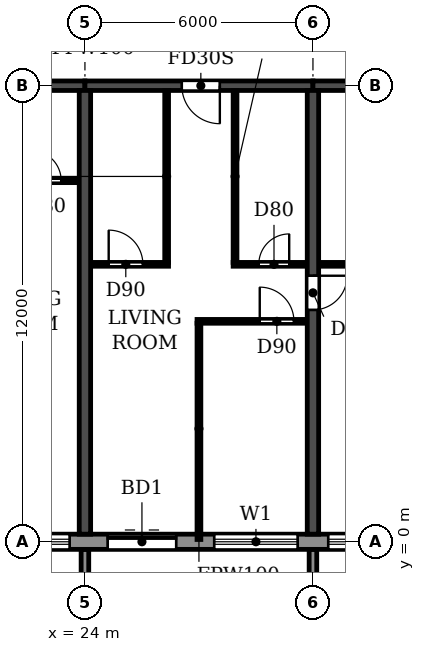
"""IFC4 building model, lengths in metres.
Left out: names, types, materials, properties, quantities, classifications, styles, units other than length and angle.
Written with IfcOpenShell. Run it as: python <this file> out.ifc"""

import sys

from ifc_helpers import new_model, si_unit, direction, frame, frame_2d, origin, place, context, subcontext, project, spatial, polyline, rectangle, outline, extrude, source, transform, mapped, element, fill, save


model = new_model("IFC4")
c1 = context("Model", 3, precision=1e-05, world=origin(), true_north=direction((0.0, 1.0)))
c2 = subcontext(c1, "Body", "Model", "MODEL_VIEW")
j1 = project(units=[si_unit("LENGTHUNIT", "METRE"), si_unit("PLANEANGLEUNIT", "RADIAN")], contexts=[c1])
p1 = place(None, origin())
s1 = spatial("IfcSite", under=j1, at=p1, CompositionType="ELEMENT")
p2 = place(p1, origin())
s2 = spatial("IfcBuilding", under=s1, at=p2, CompositionType="ELEMENT")
p3 = place(p2, frame((0.0, 0.0, 155.4)))
s3 = spatial("IfcBuildingStorey", under=s2, at=p3, CompositionType="ELEMENT", Elevation=155.4)
p4 = place(p3, frame((24.0, 0.2, 0.0), z_axis=(0.0, 0.0, 1.0), x_axis=(0.0, 1.0, 0.0)))
e1 = element("IfcWall", 1, at=p4, inside=s3, PredefinedType="SHEAR", context=c2, shape_type="SweptSolid", body=[
    extrude(rectangle(XDim=11.675, YDim=0.3, at=frame_2d((5.837, 0.0))), origin(), (0.0, 0.0, 1.0), 3.0),
])
p5 = place(p3, frame((30.0, 0.2, 0.0), z_axis=(0.0, 0.0, 1.0), x_axis=(0.0, 1.0, 0.0)))
e2 = element("IfcWall", 2, at=p5, inside=s3, PredefinedType="SHEAR", context=c2, shape_type="SweptSolid", body=[
    extrude(rectangle(XDim=11.675, YDim=0.3, at=frame_2d((5.837, 0.0))), origin(), (0.0, 0.0, 1.0), 3.0),
])
p6 = place(p5, frame((5.9, 0.0, 0.0)))
e3 = element("IfcOpeningElement", 3, at=p6, cuts=e2, PredefinedType="OPENING", context=c2, shape_type="SweptSolid", body=[
    extrude(rectangle(XDim=0.9, YDim=2.1, at=frame_2d((0.45, 1.05))), frame((0.0, 0.16, 0.0), z_axis=(0.0, -1.0, 0.0), x_axis=(1.0, 0.0, 0.0)), (0.0, 0.0, 1.0), 0.32),
])
p7 = place(p3, frame((18.0, 12.0, 0.0), z_axis=(0.0, 0.0, 1.0), x_axis=(1.0, 0.0, 0.0)))
e4 = element("IfcWall", 4, at=p7, inside=s3, PredefinedType="SHEAR", context=c2, shape_type="SweptSolid", body=[
    extrude(rectangle(XDim=6.0, YDim=0.25, at=frame_2d((3.0, 0.0))), origin(), (0.0, 0.0, 1.0), 2.4),
])
p8 = place(p7, frame((2.55, 0.0, 0.0)))
e5 = element("IfcOpeningElement", 5, at=p8, cuts=e4, PredefinedType="OPENING", context=c2, shape_type="SweptSolid", body=[
    extrude(rectangle(XDim=1.0, YDim=2.1, at=frame_2d((0.5, 1.05))), frame((0.0, 0.135, 0.0), z_axis=(0.0, -1.0, 0.0), x_axis=(1.0, 0.0, 0.0)), (0.0, 0.0, 1.0), 0.27),
])
p9 = place(p3, frame((24.0, 12.0, 0.0), z_axis=(0.0, 0.0, 1.0), x_axis=(1.0, 0.0, 0.0)))
e6 = element("IfcWall", 6, at=p9, inside=s3, PredefinedType="SHEAR", context=c2, shape_type="SweptSolid", body=[
    extrude(rectangle(XDim=6.0, YDim=0.25, at=frame_2d((3.0, 0.0))), origin(), (0.0, 0.0, 1.0), 2.4),
])
p10 = place(p9, frame((2.55, 0.0, 0.0)))
e7 = element("IfcOpeningElement", 7, at=p10, cuts=e6, PredefinedType="OPENING", context=c2, shape_type="SweptSolid", body=[
    extrude(rectangle(XDim=1.0, YDim=2.1, at=frame_2d((0.5, 1.05))), frame((0.0, 0.135, 0.0), z_axis=(0.0, -1.0, 0.0), x_axis=(1.0, 0.0, 0.0)), (0.0, 0.0, 1.0), 0.27),
])
p11 = place(p3, frame((30.0, 12.0, 0.0), z_axis=(0.0, 0.0, 1.0), x_axis=(1.0, 0.0, 0.0)))
e8 = element("IfcWall", 8, at=p11, inside=s3, PredefinedType="SHEAR", context=c2, shape_type="SweptSolid", body=[
    extrude(rectangle(XDim=6.0, YDim=0.25, at=frame_2d((3.0, 0.0))), origin(), (0.0, 0.0, 1.0), 2.4),
])
p12 = place(p3, frame((16.683, 0.0, 0.0), z_axis=(0.0, 0.0, 1.0), x_axis=(1.0, 0.0, 0.0)))
e9 = element("IfcWall", 9, at=p12, inside=s3, PredefinedType="STANDARD", context=c2, shape_type="SweptSolid", body=[
    extrude(rectangle(XDim=68.634, YDim=0.4, at=frame_2d((34.317, 0.0))), origin(), (0.0, 0.0, 1.0), 3.0),
])
p13 = place(p12, frame((1.717, 0.0, 0.9)))
e10 = element("IfcOpeningElement", 10, at=p13, cuts=e9, PredefinedType="OPENING", context=c2, shape_type="SweptSolid", body=[
    extrude(rectangle(XDim=2.2, YDim=1.5, at=frame_2d((1.1, 0.75))), frame((0.0, 0.21, 0.0), z_axis=(0.0, -1.0, 0.0), x_axis=(1.0, 0.0, 0.0)), (0.0, 0.0, 1.0), 0.42),
])
p14 = place(p12, frame((4.717, 0.0, 0.9)))
e11 = element("IfcOpeningElement", 11, at=p14, cuts=e9, PredefinedType="OPENING", context=c2, shape_type="SweptSolid", body=[
    extrude(rectangle(XDim=2.2, YDim=1.5, at=frame_2d((1.1, 0.75))), frame((0.0, 0.21, 0.0), z_axis=(0.0, -1.0, 0.0), x_axis=(1.0, 0.0, 0.0)), (0.0, 0.0, 1.0), 0.42),
])
p15 = place(p12, frame((7.917, 0.0, 0.0)))
e12 = element("IfcOpeningElement", 12, at=p15, cuts=e9, PredefinedType="OPENING", context=c2, shape_type="SweptSolid", body=[
    extrude(rectangle(XDim=1.8, YDim=2.4, at=frame_2d((0.9, 1.2))), frame((0.0, 0.21, 0.0), z_axis=(0.0, -1.0, 0.0), x_axis=(1.0, 0.0, 0.0)), (0.0, 0.0, 1.0), 0.42),
])
p16 = place(p12, frame((10.717, 0.0, 0.9)))
e13 = element("IfcOpeningElement", 13, at=p16, cuts=e9, PredefinedType="OPENING", context=c2, shape_type="SweptSolid", body=[
    extrude(rectangle(XDim=2.2, YDim=1.5, at=frame_2d((1.1, 0.75))), frame((0.0, 0.21, 0.0), z_axis=(0.0, -1.0, 0.0), x_axis=(1.0, 0.0, 0.0)), (0.0, 0.0, 1.0), 0.42),
])
p17 = place(p12, frame((13.717, 0.0, 0.9)))
e14 = element("IfcOpeningElement", 14, at=p17, cuts=e9, PredefinedType="OPENING", context=c2, shape_type="SweptSolid", body=[
    extrude(rectangle(XDim=2.2, YDim=1.5, at=frame_2d((1.1, 0.75))), frame((0.0, 0.21, 0.0), z_axis=(0.0, -1.0, 0.0), x_axis=(1.0, 0.0, 0.0)), (0.0, 0.0, 1.0), 0.42),
])
p18 = place(p12, frame((16.717, 0.0, 0.9)))
e15 = element("IfcOpeningElement", 15, at=p18, cuts=e9, PredefinedType="OPENING", context=c2, shape_type="SweptSolid", body=[
    extrude(rectangle(XDim=2.2, YDim=1.5, at=frame_2d((1.1, 0.75))), frame((0.0, 0.21, 0.0), z_axis=(0.0, -1.0, 0.0), x_axis=(1.0, 0.0, 0.0)), (0.0, 0.0, 1.0), 0.42),
])
p19 = place(p12, frame((19.717, 0.0, 0.9)))
e16 = element("IfcOpeningElement", 16, at=p19, cuts=e9, PredefinedType="OPENING", context=c2, shape_type="SweptSolid", body=[
    extrude(rectangle(XDim=2.2, YDim=1.5, at=frame_2d((1.1, 0.75))), frame((0.0, 0.21, 0.0), z_axis=(0.0, -1.0, 0.0), x_axis=(1.0, 0.0, 0.0)), (0.0, 0.0, 1.0), 0.42),
])
p20 = place(p12, frame((22.917, 0.0, 0.0)))
e17 = element("IfcOpeningElement", 17, at=p20, cuts=e9, PredefinedType="OPENING", context=c2, shape_type="SweptSolid", body=[
    extrude(rectangle(XDim=1.8, YDim=2.4, at=frame_2d((0.9, 1.2))), frame((0.0, 0.21, 0.0), z_axis=(0.0, -1.0, 0.0), x_axis=(1.0, 0.0, 0.0)), (0.0, 0.0, 1.0), 0.42),
])
p21 = place(p12, frame((25.717, 0.0, 0.9)))
e18 = element("IfcOpeningElement", 18, at=p21, cuts=e9, PredefinedType="OPENING", context=c2, shape_type="SweptSolid", body=[
    extrude(rectangle(XDim=2.2, YDim=1.5, at=frame_2d((1.1, 0.75))), frame((0.0, 0.21, 0.0), z_axis=(0.0, -1.0, 0.0), x_axis=(1.0, 0.0, 0.0)), (0.0, 0.0, 1.0), 0.42),
])
p22 = place(p12, frame((28.717, 0.0, 0.9)))
e19 = element("IfcOpeningElement", 19, at=p22, cuts=e9, PredefinedType="OPENING", context=c2, shape_type="SweptSolid", body=[
    extrude(rectangle(XDim=2.2, YDim=1.5, at=frame_2d((1.1, 0.75))), frame((0.0, 0.21, 0.0), z_axis=(0.0, -1.0, 0.0), x_axis=(1.0, 0.0, 0.0)), (0.0, 0.0, 1.0), 0.42),
])
p23 = place(p12, frame((31.917, 0.0, 0.0)))
e20 = element("IfcOpeningElement", 20, at=p23, cuts=e9, PredefinedType="OPENING", context=c2, shape_type="SweptSolid", body=[
    extrude(rectangle(XDim=1.8, YDim=2.4, at=frame_2d((0.9, 1.2))), frame((0.0, 0.21, 0.0), z_axis=(0.0, -1.0, 0.0), x_axis=(1.0, 0.0, 0.0)), (0.0, 0.0, 1.0), 0.42),
])
p24 = place(p12, frame((34.717, 0.0, 0.9)))
e21 = element("IfcOpeningElement", 21, at=p24, cuts=e9, PredefinedType="OPENING", context=c2, shape_type="SweptSolid", body=[
    extrude(rectangle(XDim=2.2, YDim=1.5, at=frame_2d((1.1, 0.75))), frame((0.0, 0.21, 0.0), z_axis=(0.0, -1.0, 0.0), x_axis=(1.0, 0.0, 0.0)), (0.0, 0.0, 1.0), 0.42),
])
p25 = place(p12, frame((37.717, 0.0, 0.9)))
e22 = element("IfcOpeningElement", 22, at=p25, cuts=e9, PredefinedType="OPENING", context=c2, shape_type="SweptSolid", body=[
    extrude(rectangle(XDim=2.2, YDim=1.5, at=frame_2d((1.1, 0.75))), frame((0.0, 0.21, 0.0), z_axis=(0.0, -1.0, 0.0), x_axis=(1.0, 0.0, 0.0)), (0.0, 0.0, 1.0), 0.42),
])
p26 = place(p12, frame((40.717, 0.0, 0.9)))
e23 = element("IfcOpeningElement", 23, at=p26, cuts=e9, PredefinedType="OPENING", context=c2, shape_type="SweptSolid", body=[
    extrude(rectangle(XDim=2.2, YDim=1.5, at=frame_2d((1.1, 0.75))), frame((0.0, 0.21, 0.0), z_axis=(0.0, -1.0, 0.0), x_axis=(1.0, 0.0, 0.0)), (0.0, 0.0, 1.0), 0.42),
])
p27 = place(p12, frame((43.717, 0.0, 0.9)))
e24 = element("IfcOpeningElement", 24, at=p27, cuts=e9, PredefinedType="OPENING", context=c2, shape_type="SweptSolid", body=[
    extrude(rectangle(XDim=2.2, YDim=1.5, at=frame_2d((1.1, 0.75))), frame((0.0, 0.21, 0.0), z_axis=(0.0, -1.0, 0.0), x_axis=(1.0, 0.0, 0.0)), (0.0, 0.0, 1.0), 0.42),
])
p28 = place(p12, frame((46.917, 0.0, 0.0)))
e25 = element("IfcOpeningElement", 25, at=p28, cuts=e9, PredefinedType="OPENING", context=c2, shape_type="SweptSolid", body=[
    extrude(rectangle(XDim=1.8, YDim=2.4, at=frame_2d((0.9, 1.2))), frame((0.0, 0.21, 0.0), z_axis=(0.0, -1.0, 0.0), x_axis=(1.0, 0.0, 0.0)), (0.0, 0.0, 1.0), 0.42),
])
p29 = place(p12, frame((49.717, 0.0, 0.9)))
e26 = element("IfcOpeningElement", 26, at=p29, cuts=e9, PredefinedType="OPENING", context=c2, shape_type="SweptSolid", body=[
    extrude(rectangle(XDim=2.2, YDim=1.5, at=frame_2d((1.1, 0.75))), frame((0.0, 0.21, 0.0), z_axis=(0.0, -1.0, 0.0), x_axis=(1.0, 0.0, 0.0)), (0.0, 0.0, 1.0), 0.42),
])
p30 = place(p12, frame((52.717, 0.0, 0.9)))
e27 = element("IfcOpeningElement", 27, at=p30, cuts=e9, PredefinedType="OPENING", context=c2, shape_type="SweptSolid", body=[
    extrude(rectangle(XDim=2.2, YDim=1.5, at=frame_2d((1.1, 0.75))), frame((0.0, 0.21, 0.0), z_axis=(0.0, -1.0, 0.0), x_axis=(1.0, 0.0, 0.0)), (0.0, 0.0, 1.0), 0.42),
])
p31 = place(p12, frame((55.717, 0.0, 0.9)))
e28 = element("IfcOpeningElement", 28, at=p31, cuts=e9, PredefinedType="OPENING", context=c2, shape_type="SweptSolid", body=[
    extrude(rectangle(XDim=2.2, YDim=1.5, at=frame_2d((1.1, 0.75))), frame((0.0, 0.21, 0.0), z_axis=(0.0, -1.0, 0.0), x_axis=(1.0, 0.0, 0.0)), (0.0, 0.0, 1.0), 0.42),
])
p32 = place(p12, frame((58.917, 0.0, 0.0)))
e29 = element("IfcOpeningElement", 29, at=p32, cuts=e9, PredefinedType="OPENING", context=c2, shape_type="SweptSolid", body=[
    extrude(rectangle(XDim=1.8, YDim=2.4, at=frame_2d((0.9, 1.2))), frame((0.0, 0.21, 0.0), z_axis=(0.0, -1.0, 0.0), x_axis=(1.0, 0.0, 0.0)), (0.0, 0.0, 1.0), 0.42),
])
p33 = place(p12, frame((61.717, 0.0, 0.9)))
e30 = element("IfcOpeningElement", 30, at=p33, cuts=e9, PredefinedType="OPENING", context=c2, shape_type="SweptSolid", body=[
    extrude(rectangle(XDim=2.2, YDim=1.5, at=frame_2d((1.1, 0.75))), frame((0.0, 0.21, 0.0), z_axis=(0.0, -1.0, 0.0), x_axis=(1.0, 0.0, 0.0)), (0.0, 0.0, 1.0), 0.42),
])
p34 = place(p12, frame((64.717, 0.0, 0.9)))
e31 = element("IfcOpeningElement", 31, at=p34, cuts=e9, PredefinedType="OPENING", context=c2, shape_type="SweptSolid", body=[
    extrude(rectangle(XDim=2.2, YDim=1.5, at=frame_2d((1.1, 0.75))), frame((0.0, 0.21, 0.0), z_axis=(0.0, -1.0, 0.0), x_axis=(1.0, 0.0, 0.0)), (0.0, 0.0, 1.0), 0.42),
])
m1 = source(origin(), c2, "Body", "SweptSolid", [
    extrude(outline(polyline([(0.0, 0.0), (0.2, 0.0), (0.2, 1.65), (0.0, 1.65), (0.0, 0.0)])), origin(), (0.0, 0.0, 1.0), 3.1),
])
for number, where in (
    (32, (23.9, -1.85, 0.0)),
    (33, (29.9, -1.85, 0.0)),
):
    element("IfcWall", number, at=place(p3, frame(where)), inside=s3, PredefinedType="STANDARD", context=c2, shape_type="MappedRepresentation", body=[
        mapped(m1, transform((0.0, 0.0, 0.0))),
    ])
p35 = place(p3, frame((26.95, 5.8, 0.0), z_axis=(0.0, 0.0, 1.0), x_axis=(1.0, 0.0, 0.0)))
e34 = element("IfcWall", 34, at=p35, inside=s3, PredefinedType="PARTITIONING", context=c2, shape_type="SweptSolid", body=[
    extrude(rectangle(XDim=2.89, YDim=0.1, at=frame_2d((1.445, 0.0))), origin(), (0.0, 0.0, 1.0), 3.0),
])
p36 = place(p35, frame((1.65, 0.0, 0.0)))
e35 = element("IfcOpeningElement", 35, at=p36, cuts=e34, PredefinedType="OPENING", context=c2, shape_type="SweptSolid", body=[
    extrude(rectangle(XDim=0.9, YDim=2.1, at=frame_2d((0.45, 1.05))), frame((0.0, 0.06, 0.0), z_axis=(0.0, -1.0, 0.0), x_axis=(1.0, 0.0, 0.0)), (0.0, 0.0, 1.0), 0.12),
])
p37 = place(p3, frame((24.16, 7.3, 0.0), z_axis=(0.0, 0.0, 1.0), x_axis=(1.0, 0.0, 0.0)))
e36 = element("IfcWall", 36, at=p37, inside=s3, PredefinedType="PARTITIONING", context=c2, shape_type="SweptSolid", body=[
    extrude(rectangle(XDim=2.04, YDim=0.1, at=frame_2d((1.02, 0.0))), origin(), (0.0, 0.0, 1.0), 3.0),
])
p38 = place(p37, frame((0.465, 0.0, 0.0)))
e37 = element("IfcOpeningElement", 37, at=p38, cuts=e36, PredefinedType="OPENING", context=c2, shape_type="SweptSolid", body=[
    extrude(rectangle(XDim=0.9, YDim=2.1, at=frame_2d((0.45, 1.05))), frame((0.0, 0.06, 0.0), z_axis=(0.0, -1.0, 0.0), x_axis=(1.0, 0.0, 0.0)), (0.0, 0.0, 1.0), 0.12),
])
p39 = place(p3, frame((27.9, 7.3, 0.0), z_axis=(0.0, 0.0, 1.0), x_axis=(1.0, 0.0, 0.0)))
e38 = element("IfcWall", 38, at=p39, inside=s3, PredefinedType="PARTITIONING", context=c2, shape_type="SweptSolid", body=[
    extrude(rectangle(XDim=1.94, YDim=0.1, at=frame_2d((0.97, 0.0))), origin(), (0.0, 0.0, 1.0), 3.0),
])
p40 = place(p39, frame((0.675, 0.0, 0.0)))
e39 = element("IfcOpeningElement", 39, at=p40, cuts=e38, PredefinedType="OPENING", context=c2, shape_type="SweptSolid", body=[
    extrude(rectangle(XDim=0.8, YDim=2.1, at=frame_2d((0.4, 1.05))), frame((0.0, 0.06, 0.0), z_axis=(0.0, -1.0, 0.0), x_axis=(1.0, 0.0, 0.0)), (0.0, 0.0, 1.0), 0.12),
])
p41 = place(p3, frame((30.16, 7.3, 0.0), z_axis=(0.0, 0.0, 1.0), x_axis=(1.0, 0.0, 0.0)))
e40 = element("IfcWall", 40, at=p41, inside=s3, PredefinedType="PARTITIONING", context=c2, shape_type="SweptSolid", body=[
    extrude(rectangle(XDim=2.94, YDim=0.1, at=frame_2d((1.47, 0.0))), origin(), (0.0, 0.0, 1.0), 3.0),
])
p42 = place(p41, frame((0.94, 0.0, 0.0)))
e41 = element("IfcOpeningElement", 41, at=p42, cuts=e40, PredefinedType="OPENING", context=c2, shape_type="SweptSolid", body=[
    extrude(rectangle(XDim=0.8, YDim=2.1, at=frame_2d((0.4, 1.05))), frame((0.0, 0.06, 0.0), z_axis=(0.0, -1.0, 0.0), x_axis=(1.0, 0.0, 0.0)), (0.0, 0.0, 1.0), 0.12),
])
p43 = place(p3, frame((21.9, 9.5, 0.0), z_axis=(0.0, 0.0, 1.0), x_axis=(1.0, 0.0, 0.0)))
e42 = element("IfcWall", 42, at=p43, inside=s3, PredefinedType="PARTITIONING", context=c2, shape_type="SweptSolid", body=[
    extrude(rectangle(XDim=1.94, YDim=0.1, at=frame_2d((0.97, 0.0))), origin(), (0.0, 0.0, 1.0), 3.0),
])
p44 = place(p43, frame((0.675, 0.0, 0.0)))
e43 = element("IfcOpeningElement", 43, at=p44, cuts=e42, PredefinedType="OPENING", context=c2, shape_type="SweptSolid", body=[
    extrude(rectangle(XDim=0.8, YDim=2.1, at=frame_2d((0.4, 1.05))), frame((0.0, 0.06, 0.0), z_axis=(0.0, -1.0, 0.0), x_axis=(1.0, 0.0, 0.0)), (0.0, 0.0, 1.0), 0.12),
])
p45 = place(p3, frame((26.15, 7.35, 0.0), z_axis=(0.0, 0.0, 1.0), x_axis=(0.0, 1.0, 0.0)))
e44 = element("IfcWall", 44, at=p45, inside=s3, PredefinedType="PARTITIONING", context=c2, shape_type="SweptSolid", body=[
    extrude(rectangle(XDim=4.515, YDim=0.1, at=frame_2d((2.257, 0.0))), origin(), (0.0, 0.0, 1.0), 3.0),
])
p46 = place(p3, frame((27.0, 0.06, 0.0), z_axis=(0.0, 0.0, 1.0), x_axis=(0.0, 1.0, 0.0)))
e45 = element("IfcWall", 45, at=p46, inside=s3, PredefinedType="PARTITIONING", context=c2, shape_type="SweptSolid", body=[
    extrude(rectangle(XDim=5.69, YDim=0.1, at=frame_2d((2.845, 0.0))), origin(), (0.0, 0.0, 1.0), 3.0),
])
p47 = place(p3, frame((27.95, 7.35, 0.0), z_axis=(0.0, 0.0, 1.0), x_axis=(0.0, 1.0, 0.0)))
e46 = element("IfcWall", 46, at=p47, inside=s3, PredefinedType="PARTITIONING", context=c2, shape_type="SweptSolid", body=[
    extrude(rectangle(XDim=4.515, YDim=0.1, at=frame_2d((2.257, 0.0))), origin(), (0.0, 0.0, 1.0), 3.0),
])
p48 = place(p14, origin())
e47 = element("IfcWindow", 47, at=p48, inside=s3, PartitioningType="DOUBLE_PANEL_HORIZONTAL", PredefinedType="WINDOW", context=c2, shape_type="SweptSolid", body=[
    extrude(rectangle(XDim=2.2, YDim=1.5, at=frame_2d((1.1, 0.75))), frame((0.0, 0.03, 0.0), z_axis=(0.0, -1.0, 0.0), x_axis=(1.0, 0.0, 0.0)), (0.0, 0.0, 1.0), 0.06),
])
fill(e11, e47)
p49 = place(p15, origin())
e48 = element("IfcDoor", 48, at=p49, inside=s3, OperationType="DOUBLE_DOOR_SLIDING", PredefinedType="DOOR", context=c2, shape_type="SweptSolid", body=[
    extrude(rectangle(XDim=1.8, YDim=2.4, at=frame_2d((0.9, 1.2))), frame((0.0, 0.025, 0.0), z_axis=(0.0, -1.0, 0.0), x_axis=(1.0, 0.0, 0.0)), (0.0, 0.0, 1.0), 0.05),
])
fill(e12, e48)
p50 = place(p16, origin())
e49 = element("IfcWindow", 49, at=p50, inside=s3, PartitioningType="DOUBLE_PANEL_HORIZONTAL", PredefinedType="WINDOW", context=c2, shape_type="SweptSolid", body=[
    extrude(rectangle(XDim=2.2, YDim=1.5, at=frame_2d((1.1, 0.75))), frame((0.0, 0.03, 0.0), z_axis=(0.0, -1.0, 0.0), x_axis=(1.0, 0.0, 0.0)), (0.0, 0.0, 1.0), 0.06),
])
fill(e13, e49)
p51 = place(p17, origin())
e50 = element("IfcWindow", 50, at=p51, inside=s3, PartitioningType="DOUBLE_PANEL_HORIZONTAL", PredefinedType="WINDOW", context=c2, shape_type="SweptSolid", body=[
    extrude(rectangle(XDim=2.2, YDim=1.5, at=frame_2d((1.1, 0.75))), frame((0.0, 0.03, 0.0), z_axis=(0.0, -1.0, 0.0), x_axis=(1.0, 0.0, 0.0)), (0.0, 0.0, 1.0), 0.06),
])
fill(e14, e50)
p52 = place(p44, origin())
e51 = element("IfcDoor", 51, at=p52, inside=s3, OperationType="SINGLE_SWING_LEFT", PredefinedType="DOOR", context=c2, shape_type="SweptSolid", body=[
    extrude(rectangle(XDim=0.8, YDim=2.1, at=frame_2d((0.4, 1.05))), frame((0.0, 0.025, 0.0), z_axis=(0.0, -1.0, 0.0), x_axis=(1.0, 0.0, 0.0)), (0.0, 0.0, 1.0), 0.05),
])
fill(e43, e51)
p53 = place(p38, origin())
e52 = element("IfcDoor", 52, at=p53, inside=s3, OperationType="SINGLE_SWING_LEFT", PredefinedType="DOOR", context=c2, shape_type="SweptSolid", body=[
    extrude(rectangle(XDim=0.9, YDim=2.1, at=frame_2d((0.45, 1.05))), frame((0.0, 0.025, 0.0), z_axis=(0.0, -1.0, 0.0), x_axis=(1.0, 0.0, 0.0)), (0.0, 0.0, 1.0), 0.05),
])
fill(e37, e52)
p54 = place(p10, frame((1.0, 0.0, 0.0), z_axis=(0.0, 0.0, 1.0), x_axis=(-1.0, 0.0, 0.0)))
e53 = element("IfcDoor", 53, at=p54, inside=s3, OperationType="SINGLE_SWING_LEFT", PredefinedType="DOOR", context=c2, shape_type="SweptSolid", body=[
    extrude(rectangle(XDim=1.0, YDim=2.1, at=frame_2d((0.5, 1.05))), frame((0.0, 0.025, 0.0), z_axis=(0.0, -1.0, 0.0), x_axis=(1.0, 0.0, 0.0)), (0.0, 0.0, 1.0), 0.05),
])
fill(e7, e53)
p55 = place(p40, origin())
e54 = element("IfcDoor", 54, at=p55, inside=s3, OperationType="SINGLE_SWING_RIGHT", PredefinedType="DOOR", context=c2, shape_type="SweptSolid", body=[
    extrude(rectangle(XDim=0.8, YDim=2.1, at=frame_2d((0.4, 1.05))), frame((0.0, 0.025, 0.0), z_axis=(0.0, -1.0, 0.0), x_axis=(1.0, 0.0, 0.0)), (0.0, 0.0, 1.0), 0.05),
])
fill(e39, e54)
p56 = place(p36, origin())
e55 = element("IfcDoor", 55, at=p56, inside=s3, OperationType="SINGLE_SWING_LEFT", PredefinedType="DOOR", context=c2, shape_type="SweptSolid", body=[
    extrude(rectangle(XDim=0.9, YDim=2.1, at=frame_2d((0.45, 1.05))), frame((0.0, 0.025, 0.0), z_axis=(0.0, -1.0, 0.0), x_axis=(1.0, 0.0, 0.0)), (0.0, 0.0, 1.0), 0.05),
])
fill(e35, e55)
p57 = place(p6, frame((0.9, 0.0, 0.0), z_axis=(0.0, 0.0, 1.0), x_axis=(-1.0, 0.0, 0.0)))
e56 = element("IfcDoor", 56, at=p57, inside=s3, OperationType="SINGLE_SWING_LEFT", PredefinedType="DOOR", context=c2, shape_type="SweptSolid", body=[
    extrude(rectangle(XDim=0.9, YDim=2.1, at=frame_2d((0.45, 1.05))), frame((0.0, 0.025, 0.0), z_axis=(0.0, -1.0, 0.0), x_axis=(1.0, 0.0, 0.0)), (0.0, 0.0, 1.0), 0.05),
])
fill(e3, e56)
save(model, sys.argv[1])
